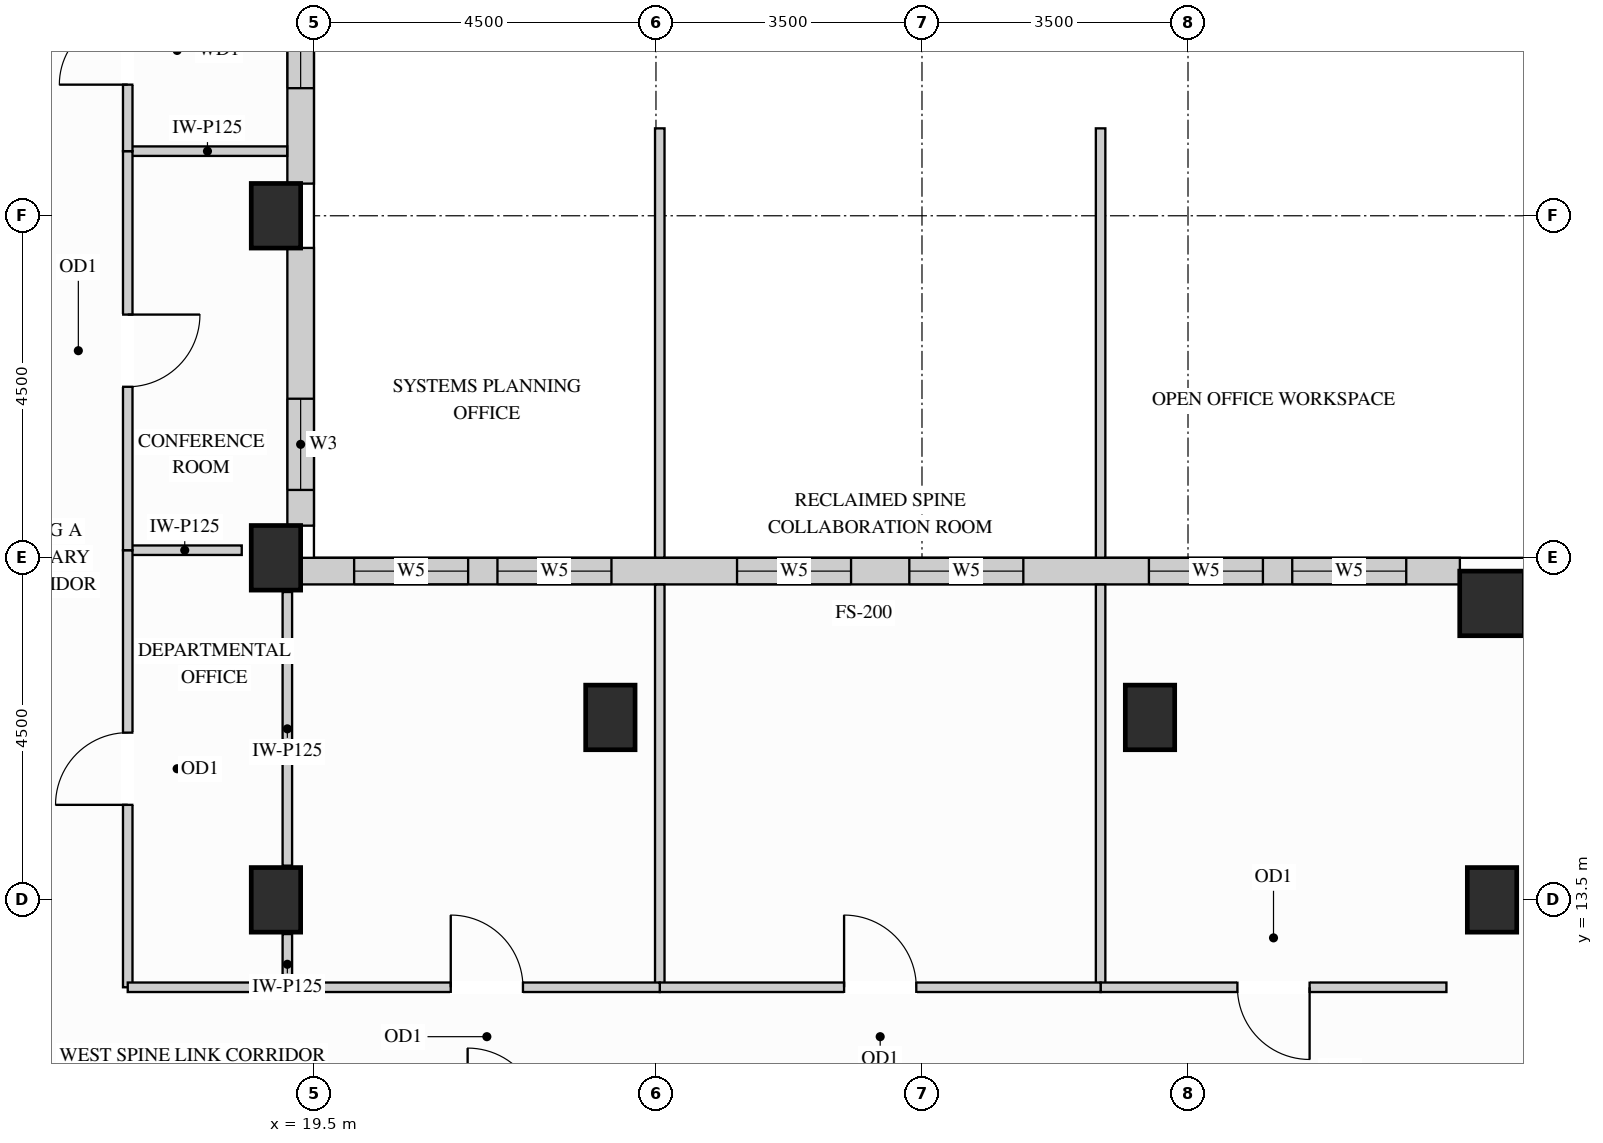
"""IFC4 building model, lengths in metres.
Left out: names, types, materials, properties, quantities, classifications, styles, units other than length and angle.
Written with IfcOpenShell. Run it as: python <this file> out.ifc"""

import sys

from ifc_helpers import new_model, si_unit, direction, frame, frame_2d, origin, origin_2d, place, context, subcontext, project, spatial, rectangle, extrude, source, transform, mapped, element, fill, save


model = new_model("IFC4")
c1 = context("Model", 3, precision=1e-05, world=origin(), true_north=direction((0.0, 1.0)))
c2 = subcontext(c1, "Body", "Model", "MODEL_VIEW")
j1 = project(units=[si_unit("LENGTHUNIT", "METRE"), si_unit("PLANEANGLEUNIT", "RADIAN")], contexts=[c1])
p1 = place(None, origin())
s1 = spatial("IfcSite", under=j1, at=p1, CompositionType="ELEMENT")
p2 = place(p1, origin())
s2 = spatial("IfcBuilding", under=s1, at=p2, CompositionType="ELEMENT")
p3 = place(p2, frame((0.0, 0.0, 216.0)))
s3 = spatial("IfcBuildingStorey", under=s2, at=p3, CompositionType="ELEMENT", Elevation=216.0)
m1 = source(origin(), c2, "Body", "SweptSolid", [
    extrude(rectangle(XDim=0.65, YDim=0.85, at=origin_2d()), origin(), (0.0, 0.0, 1.0), 3.4),
])
for number, where, z_axis, x_axis in (
    (1, (19.0, 13.5, 0.0), (0.0, 0.0, 1.0), (1.0, 0.0, 0.0)),
    (2, (19.0, 18.0, 0.0), (0.0, 0.0, 1.0), (1.0, 0.0, 0.0)),
    (3, (19.0, 22.5, 0.0), (0.0, 0.0, 1.0), (1.0, 0.0, 0.0)),
    (4, (35.0, 13.5, 0.0), (0.0, 0.0, 1.0), (1.0, 0.0, 0.0)),
    (5, (23.4, 15.9, 0.0), (0.0, 0.0, 1.0), (1.0, 0.0, 0.0)),
    (6, (30.5, 15.9, 0.0), (0.0, 0.0, 1.0), (1.0, 0.0, 0.0)),
):
    element("IfcColumn", number, at=place(p3, frame(where, z_axis=z_axis, x_axis=x_axis)), inside=s3, PredefinedType="COLUMN", context=c2, shape_type="MappedRepresentation", body=[
        mapped(m1, transform((0.0, 0.0, 0.0), x_axis=(1.0, 0.0, 0.0), y_axis=(0.0, 1.0, 0.0), z_axis=(0.0, 0.0, 1.0))),
    ])
m2 = source(origin(), c2, "Body", "SweptSolid", [
    extrude(rectangle(XDim=0.85, YDim=0.85, at=origin_2d()), origin(), (0.0, 0.0, 1.0), 3.4),
])
p4 = place(p3, frame((35.0, 17.4, 0.0), z_axis=(0.0, 0.0, 1.0), x_axis=(1.0, 0.0, 0.0)))
e7 = element("IfcColumn", 7, at=p4, inside=s3, PredefinedType="COLUMN", context=c2, shape_type="MappedRepresentation", body=[
    mapped(m2, transform((0.0, 0.0, 0.0), x_axis=(1.0, 0.0, 0.0), y_axis=(0.0, 1.0, 0.0), z_axis=(0.0, 0.0, 1.0))),
])
p5 = place(p3, frame((34.577, 17.825, 0.0), z_axis=(0.0, 0.0, 1.0), x_axis=(-1.0, 0.0, 0.0)))
e8 = element("IfcWall", 8, at=p5, inside=s3, PredefinedType="SOLIDWALL", context=c2, shape_type="SweptSolid", body=[
    extrude(rectangle(XDim=15.254, YDim=0.35, at=frame_2d((7.627, 0.0))), origin(), (0.0, 0.0, 1.0), 3.385),
])
p6 = place(p5, frame((0.706, 0.0, 0.78)))
e9 = element("IfcOpeningElement", 9, at=p6, cuts=e8, PredefinedType="OPENING", context=c2, shape_type="SweptSolid", body=[
    extrude(rectangle(XDim=1.5, YDim=2.0, at=frame_2d((0.75, 1.0))), frame((0.0, 0.185, 0.0), z_axis=(0.0, -1.0, 0.0), x_axis=(1.0, 0.0, 0.0)), (0.0, 0.0, 1.0), 0.37),
])
p7 = place(p5, frame((2.591, 0.0, 0.78)))
e10 = element("IfcOpeningElement", 10, at=p7, cuts=e8, PredefinedType="OPENING", context=c2, shape_type="SweptSolid", body=[
    extrude(rectangle(XDim=1.5, YDim=2.0, at=frame_2d((0.75, 1.0))), frame((0.0, 0.185, 0.0), z_axis=(0.0, -1.0, 0.0), x_axis=(1.0, 0.0, 0.0)), (0.0, 0.0, 1.0), 0.37),
])
p8 = place(p5, frame((5.744, 0.0, 0.78)))
e11 = element("IfcOpeningElement", 11, at=p8, cuts=e8, PredefinedType="OPENING", context=c2, shape_type="SweptSolid", body=[
    extrude(rectangle(XDim=1.5, YDim=2.0, at=frame_2d((0.75, 1.0))), frame((0.0, 0.185, 0.0), z_axis=(0.0, -1.0, 0.0), x_axis=(1.0, 0.0, 0.0)), (0.0, 0.0, 1.0), 0.37),
])
p9 = place(p5, frame((8.01, 0.0, 0.78)))
e12 = element("IfcOpeningElement", 12, at=p9, cuts=e8, PredefinedType="OPENING", context=c2, shape_type="SweptSolid", body=[
    extrude(rectangle(XDim=1.5, YDim=2.0, at=frame_2d((0.75, 1.0))), frame((0.0, 0.185, 0.0), z_axis=(0.0, -1.0, 0.0), x_axis=(1.0, 0.0, 0.0)), (0.0, 0.0, 1.0), 0.37),
])
p10 = place(p5, frame((11.163, 0.0, 0.78)))
e13 = element("IfcOpeningElement", 13, at=p10, cuts=e8, PredefinedType="OPENING", context=c2, shape_type="SweptSolid", body=[
    extrude(rectangle(XDim=1.5, YDim=2.0, at=frame_2d((0.75, 1.0))), frame((0.0, 0.185, 0.0), z_axis=(0.0, -1.0, 0.0), x_axis=(1.0, 0.0, 0.0)), (0.0, 0.0, 1.0), 0.37),
])
p11 = place(p5, frame((13.048, 0.0, 0.78)))
e14 = element("IfcOpeningElement", 14, at=p11, cuts=e8, PredefinedType="OPENING", context=c2, shape_type="SweptSolid", body=[
    extrude(rectangle(XDim=1.5, YDim=2.0, at=frame_2d((0.75, 1.0))), frame((0.0, 0.185, 0.0), z_axis=(0.0, -1.0, 0.0), x_axis=(1.0, 0.0, 0.0)), (0.0, 0.0, 1.0), 0.37),
])
p12 = place(p3, frame((19.325, 18.423, 0.0), z_axis=(0.0, 0.0, 1.0), x_axis=(0.0, 1.0, 0.0)))
e15 = element("IfcWall", 15, at=p12, inside=s3, PredefinedType="SOLIDWALL", context=c2, shape_type="SweptSolid", body=[
    extrude(rectangle(XDim=3.654, YDim=0.35, at=frame_2d((1.827, 0.0))), origin(), (0.0, 0.0, 1.0), 2.619),
])
p13 = place(p12, frame((0.47, 0.0, 0.78)))
e16 = element("IfcOpeningElement", 16, at=p13, cuts=e15, PredefinedType="OPENING", context=c2, shape_type="SweptSolid", body=[
    extrude(rectangle(XDim=1.2, YDim=1.659, at=frame_2d((0.6, 0.83))), frame((0.0, 0.185, 0.0), z_axis=(0.0, -1.0, 0.0), x_axis=(1.0, 0.0, 0.0)), (0.0, 0.0, 1.0), 0.37),
])
p14 = place(p3, frame((19.325, 22.923, 0.0), z_axis=(0.0, 0.0, 1.0), x_axis=(0.0, 1.0, 0.0)))
e17 = element("IfcWall", 17, at=p14, inside=s3, PredefinedType="SOLIDWALL", context=c2, shape_type="SweptSolid", body=[
    extrude(rectangle(XDim=3.454, YDim=0.35, at=frame_2d((1.727, 0.0))), origin(), (0.0, 0.0, 1.0), 2.619),
])
p15 = place(p14, frame((1.256, 0.0, 0.78)))
e18 = element("IfcOpeningElement", 18, at=p15, cuts=e17, PredefinedType="OPENING", context=c2, shape_type="SweptSolid", body=[
    extrude(rectangle(XDim=1.5, YDim=1.659, at=frame_2d((0.75, 0.83))), frame((0.0, 0.185, 0.0), z_axis=(0.0, -1.0, 0.0), x_axis=(1.0, 0.0, 0.0)), (0.0, 0.0, 1.0), 0.37),
])
m3 = source(origin(), c2, "Body", "SweptSolid", [
    extrude(rectangle(XDim=1.5, YDim=0.125, at=frame_2d((0.75, 0.0))), origin(), (0.0, 0.0, 1.0), 2.773),
])
p16 = place(p3, frame((17.05, 18.1, 0.0), z_axis=(0.0, 0.0, 1.0), x_axis=(1.0, 0.0, 0.0)))
e19 = element("IfcWall", 19, at=p16, inside=s3, PredefinedType="PARTITIONING", context=c2, shape_type="MappedRepresentation", body=[
    mapped(m3, transform((0.0, 0.0, 0.0), x_axis=(1.0, 0.0, 0.0), y_axis=(0.0, 1.0, 0.0), z_axis=(0.0, 0.0, 1.0))),
])
m4 = source(origin(), c2, "Body", "SweptSolid", [
    extrude(rectangle(XDim=2.098, YDim=0.125, at=frame_2d((1.049, 0.0))), origin(), (0.0, 0.0, 1.0), 3.385),
])
p17 = place(p3, frame((17.05, 23.35, 0.0), z_axis=(0.0, 0.0, 1.0), x_axis=(1.0, 0.0, 0.0)))
e20 = element("IfcWall", 20, at=p17, inside=s3, PredefinedType="PARTITIONING", context=c2, shape_type="MappedRepresentation", body=[
    mapped(m4, transform((0.0, 0.0, 0.0), x_axis=(1.0, 0.0, 0.0), y_axis=(0.0, 1.0, 0.0), z_axis=(0.0, 0.0, 1.0))),
])
m5 = source(origin(), c2, "Body", "SweptSolid", [
    extrude(rectangle(XDim=0.7, YDim=0.125, at=frame_2d((0.35, 0.0))), origin(), (0.0, 0.0, 1.0), 2.773),
])
p18 = place(p3, frame((19.15, 12.35, 0.0), z_axis=(0.0, 0.0, 1.0), x_axis=(0.0, 1.0, 0.0)))
e21 = element("IfcWall", 21, at=p18, inside=s3, PredefinedType="PARTITIONING", context=c2, shape_type="MappedRepresentation", body=[
    mapped(m5, transform((0.0, 0.0, 0.0), x_axis=(1.0, 0.0, 0.0), y_axis=(0.0, 1.0, 0.0), z_axis=(0.0, 0.0, 1.0))),
])
m6 = source(origin(), c2, "Body", "SweptSolid", [
    extrude(rectangle(XDim=3.6, YDim=0.125, at=frame_2d((1.8, 0.0))), origin(), (0.0, 0.0, 1.0), 2.773),
])
p19 = place(p3, frame((19.15, 13.95, 0.0), z_axis=(0.0, 0.0, 1.0), x_axis=(0.0, 1.0, 0.0)))
e22 = element("IfcWall", 22, at=p19, inside=s3, PredefinedType="PARTITIONING", context=c2, shape_type="MappedRepresentation", body=[
    mapped(m6, transform((0.0, 0.0, 0.0), x_axis=(1.0, 0.0, 0.0), y_axis=(0.0, 1.0, 0.0), z_axis=(0.0, 0.0, 1.0))),
])
p20 = place(p3, frame((17.05, 12.35, 0.0), z_axis=(0.0, 0.0, 1.0), x_axis=(0.0, 1.0, 0.0)))
e23 = element("IfcWall", 23, at=p20, inside=s3, PredefinedType="PARTITIONING", context=c2, shape_type="SweptSolid", body=[
    extrude(rectangle(XDim=5.75, YDim=0.125, at=frame_2d((2.875, 0.0))), origin(), (0.0, 0.0, 1.0), 3.385),
])
p21 = place(p20, frame((2.4, 0.0, 0.0)))
e24 = element("IfcOpeningElement", 24, at=p21, cuts=e23, PredefinedType="OPENING", context=c2, shape_type="SweptSolid", body=[
    extrude(rectangle(XDim=0.95, YDim=2.15, at=frame_2d((0.475, 1.075))), frame((0.0, 0.073, 0.0), z_axis=(0.0, -1.0, 0.0), x_axis=(1.0, 0.0, 0.0)), (0.0, 0.0, 1.0), 0.145),
])
p22 = place(p3, frame((17.05, 18.1, 0.0), z_axis=(0.0, 0.0, 1.0), x_axis=(0.0, 1.0, 0.0)))
e25 = element("IfcWall", 25, at=p22, inside=s3, PredefinedType="PARTITIONING", context=c2, shape_type="SweptSolid", body=[
    extrude(rectangle(XDim=5.25, YDim=0.125, at=frame_2d((2.625, 0.0))), origin(), (0.0, 0.0, 1.0), 3.385),
])
p23 = place(p22, frame((2.15, 0.0, 0.0)))
e26 = element("IfcOpeningElement", 26, at=p23, cuts=e25, PredefinedType="OPENING", context=c2, shape_type="SweptSolid", body=[
    extrude(rectangle(XDim=0.95, YDim=2.15, at=frame_2d((0.475, 1.075))), frame((0.0, 0.073, 0.0), z_axis=(0.0, -1.0, 0.0), x_axis=(1.0, 0.0, 0.0)), (0.0, 0.0, 1.0), 0.145),
])
p24 = place(p3, frame((17.05, 23.35, 0.0), z_axis=(0.0, 0.0, 1.0), x_axis=(0.0, 1.0, 0.0)))
e27 = element("IfcWall", 27, at=p24, inside=s3, PredefinedType="PARTITIONING", context=c2, shape_type="SweptSolid", body=[
    extrude(rectangle(XDim=2.7, YDim=0.125, at=frame_2d((1.35, 0.0))), origin(), (0.0, 0.0, 1.0), 3.385),
])
p25 = place(p24, frame((0.875, 0.0, 0.0)))
e28 = element("IfcOpeningElement", 28, at=p25, cuts=e27, PredefinedType="OPENING", context=c2, shape_type="SweptSolid", body=[
    extrude(rectangle(XDim=0.9, YDim=2.15, at=frame_2d((0.45, 1.075))), frame((0.0, 0.073, 0.0), z_axis=(0.0, -1.0, 0.0), x_axis=(1.0, 0.0, 0.0)), (0.0, 0.0, 1.0), 0.145),
])
m7 = source(origin(), c2, "Body", "SweptSolid", [
    extrude(rectangle(XDim=5.298, YDim=0.125, at=frame_2d((2.649, 0.0))), origin(), (0.0, 0.0, 1.0), 3.385),
])
p26 = place(p3, frame((24.05, 12.35, 0.0), z_axis=(0.0, 0.0, 1.0), x_axis=(0.0, 1.0, 0.0)))
e29 = element("IfcWall", 29, at=p26, inside=s3, PredefinedType="PARTITIONING", context=c2, shape_type="MappedRepresentation", body=[
    mapped(m7, transform((0.0, 0.0, 0.0), x_axis=(1.0, 0.0, 0.0), y_axis=(0.0, 1.0, 0.0), z_axis=(0.0, 0.0, 1.0))),
])
m8 = source(origin(), c2, "Body", "SweptSolid", [
    extrude(rectangle(XDim=5.648, YDim=0.125, at=frame_2d((2.824, 0.0))), origin(), (0.0, 0.0, 1.0), 3.385),
])
p27 = place(p3, frame((24.05, 18.002, 0.0), z_axis=(0.0, 0.0, 1.0), x_axis=(0.0, 1.0, 0.0)))
e30 = element("IfcWall", 30, at=p27, inside=s3, PredefinedType="PARTITIONING", context=c2, shape_type="MappedRepresentation", body=[
    mapped(m8, transform((0.0, 0.0, 0.0), x_axis=(1.0, 0.0, 0.0), y_axis=(0.0, 1.0, 0.0), z_axis=(0.0, 0.0, 1.0))),
])
p28 = place(p3, frame((29.85, 12.35, 0.0), z_axis=(0.0, 0.0, 1.0), x_axis=(0.0, 1.0, 0.0)))
e31 = element("IfcWall", 31, at=p28, inside=s3, PredefinedType="PARTITIONING", context=c2, shape_type="MappedRepresentation", body=[
    mapped(m7, transform((0.0, 0.0, 0.0), x_axis=(1.0, 0.0, 0.0), y_axis=(0.0, 1.0, 0.0), z_axis=(0.0, 0.0, 1.0))),
])
p29 = place(p3, frame((29.85, 18.002, 0.0), z_axis=(0.0, 0.0, 1.0), x_axis=(0.0, 1.0, 0.0)))
e32 = element("IfcWall", 32, at=p29, inside=s3, PredefinedType="PARTITIONING", context=c2, shape_type="MappedRepresentation", body=[
    mapped(m8, transform((0.0, 0.0, 0.0), x_axis=(1.0, 0.0, 0.0), y_axis=(0.0, 1.0, 0.0), z_axis=(0.0, 0.0, 1.0))),
])
p30 = place(p3, frame((29.85, 12.35, 0.0), z_axis=(0.0, 0.0, 1.0), x_axis=(1.0, 0.0, 0.0)))
e33 = element("IfcWall", 33, at=p30, inside=s3, PredefinedType="PARTITIONING", context=c2, shape_type="SweptSolid", body=[
    extrude(rectangle(XDim=4.55, YDim=0.125, at=frame_2d((2.275, 0.0))), origin(), (0.0, 0.0, 1.0), 3.385),
])
p31 = place(p30, frame((1.8, 0.0, 0.0)))
e34 = element("IfcOpeningElement", 34, at=p31, cuts=e33, PredefinedType="OPENING", context=c2, shape_type="SweptSolid", body=[
    extrude(rectangle(XDim=0.95, YDim=2.15, at=frame_2d((0.475, 1.075))), frame((0.0, 0.073, 0.0), z_axis=(0.0, -1.0, 0.0), x_axis=(1.0, 0.0, 0.0)), (0.0, 0.0, 1.0), 0.145),
])
p32 = place(p3, frame((24.05, 12.35, 0.0), z_axis=(0.0, 0.0, 1.0), x_axis=(1.0, 0.0, 0.0)))
e35 = element("IfcWall", 35, at=p32, inside=s3, PredefinedType="PARTITIONING", context=c2, shape_type="SweptSolid", body=[
    extrude(rectangle(XDim=5.8, YDim=0.125, at=frame_2d((2.9, 0.0))), origin(), (0.0, 0.0, 1.0), 3.385),
])
p33 = place(p32, frame((2.425, 0.0, 0.0)))
e36 = element("IfcOpeningElement", 36, at=p33, cuts=e35, PredefinedType="OPENING", context=c2, shape_type="SweptSolid", body=[
    extrude(rectangle(XDim=0.95, YDim=2.15, at=frame_2d((0.475, 1.075))), frame((0.0, 0.073, 0.0), z_axis=(0.0, -1.0, 0.0), x_axis=(1.0, 0.0, 0.0)), (0.0, 0.0, 1.0), 0.145),
])
m9 = source(origin(), c2, "Body", "SweptSolid", [
    extrude(rectangle(XDim=2.45, YDim=0.125, at=frame_2d((1.225, 0.0))), origin(), (0.0, 0.0, 1.0), 3.385),
])
p34 = place(p3, frame((17.05, 12.35, 0.0), z_axis=(0.0, 0.0, 1.0), x_axis=(1.0, 0.0, 0.0)))
e37 = element("IfcWall", 37, at=p34, inside=s3, PredefinedType="PARTITIONING", context=c2, shape_type="MappedRepresentation", body=[
    mapped(m9, transform((0.0, 0.0, 0.0), x_axis=(1.0, 0.0, 0.0), y_axis=(0.0, 1.0, 0.0), z_axis=(0.0, 0.0, 1.0))),
])
p35 = place(p3, frame((19.5, 12.35, 0.0), z_axis=(0.0, 0.0, 1.0), x_axis=(1.0, 0.0, 0.0)))
e38 = element("IfcWall", 38, at=p35, inside=s3, PredefinedType="PARTITIONING", context=c2, shape_type="SweptSolid", body=[
    extrude(rectangle(XDim=4.55, YDim=0.125, at=frame_2d((2.275, 0.0))), origin(), (0.0, 0.0, 1.0), 3.385),
])
p36 = place(p35, frame((1.8, 0.0, 0.0)))
e39 = element("IfcOpeningElement", 39, at=p36, cuts=e38, PredefinedType="OPENING", context=c2, shape_type="SweptSolid", body=[
    extrude(rectangle(XDim=0.95, YDim=2.15, at=frame_2d((0.475, 1.075))), frame((0.0, 0.073, 0.0), z_axis=(0.0, -1.0, 0.0), x_axis=(1.0, 0.0, 0.0)), (0.0, 0.0, 1.0), 0.145),
])
m10 = source(origin(), c2, "Body", "SweptSolid", [
    extrude(rectangle(XDim=0.95, YDim=2.15, at=frame_2d((0.475, 1.075))), frame((0.0, 0.025, 0.0), z_axis=(0.0, -1.0, 0.0), x_axis=(1.0, 0.0, 0.0)), (0.0, 0.0, 1.0), 0.05),
])
p37 = place(p21, origin())
e40 = element("IfcDoor", 40, at=p37, inside=s3, OperationType="SINGLE_SWING_LEFT", PredefinedType="DOOR", context=c2, shape_type="MappedRepresentation", body=[
    mapped(m10, transform((0.0, 0.0, 0.0), x_axis=(1.0, 0.0, 0.0), y_axis=(0.0, 1.0, 0.0), z_axis=(0.0, 0.0, 1.0))),
])
fill(e24, e40)
p38 = place(p23, origin())
e41 = element("IfcDoor", 41, at=p38, inside=s3, OperationType="SINGLE_SWING_RIGHT", PredefinedType="DOOR", context=c2, shape_type="MappedRepresentation", body=[
    mapped(m10, transform((0.0, 0.0, 0.0), x_axis=(1.0, 0.0, 0.0), y_axis=(0.0, 1.0, 0.0), z_axis=(0.0, 0.0, 1.0))),
])
fill(e26, e41)
p39 = place(p33, origin())
e42 = element("IfcDoor", 42, at=p39, inside=s3, OperationType="SINGLE_SWING_LEFT", PredefinedType="DOOR", context=c2, shape_type="MappedRepresentation", body=[
    mapped(m10, transform((0.0, 0.0, 0.0), x_axis=(1.0, 0.0, 0.0), y_axis=(0.0, 1.0, 0.0), z_axis=(0.0, 0.0, 1.0))),
])
fill(e36, e42)
p40 = place(p36, origin())
e43 = element("IfcDoor", 43, at=p40, inside=s3, OperationType="SINGLE_SWING_LEFT", PredefinedType="DOOR", context=c2, shape_type="MappedRepresentation", body=[
    mapped(m10, transform((0.0, 0.0, 0.0), x_axis=(1.0, 0.0, 0.0), y_axis=(0.0, 1.0, 0.0), z_axis=(0.0, 0.0, 1.0))),
])
fill(e39, e43)
p41 = place(p31, origin())
e44 = element("IfcDoor", 44, at=p41, inside=s3, OperationType="SINGLE_SWING_RIGHT", PredefinedType="DOOR", context=c2, shape_type="MappedRepresentation", body=[
    mapped(m10, transform((0.0, 0.0, 0.0), x_axis=(1.0, 0.0, 0.0), y_axis=(0.0, 1.0, 0.0), z_axis=(0.0, 0.0, 1.0))),
])
fill(e34, e44)
m11 = source(origin(), c2, "Body", "SweptSolid", [
    extrude(rectangle(XDim=0.9, YDim=2.15, at=frame_2d((0.45, 1.075))), frame((0.0, 0.025, 0.0), z_axis=(0.0, -1.0, 0.0), x_axis=(1.0, 0.0, 0.0)), (0.0, 0.0, 1.0), 0.05),
])
p42 = place(p25, origin())
e45 = element("IfcDoor", 45, at=p42, inside=s3, OperationType="SINGLE_SWING_LEFT", PredefinedType="DOOR", context=c2, shape_type="MappedRepresentation", body=[
    mapped(m11, transform((0.0, 0.0, 0.0), x_axis=(1.0, 0.0, 0.0), y_axis=(0.0, 1.0, 0.0), z_axis=(0.0, 0.0, 1.0))),
])
fill(e28, e45)
m12 = source(origin(), c2, "Body", "SweptSolid", [
    extrude(rectangle(XDim=1.2, YDim=1.659, at=frame_2d((0.6, 0.83))), frame((0.0, 0.03, 0.0), z_axis=(0.0, -1.0, 0.0), x_axis=(1.0, 0.0, 0.0)), (0.0, 0.0, 1.0), 0.06),
])
p43 = place(p13, origin())
e46 = element("IfcWindow", 46, at=p43, inside=s3, PartitioningType="SINGLE_PANEL", PredefinedType="WINDOW", context=c2, shape_type="MappedRepresentation", body=[
    mapped(m12, transform((0.0, 0.0, 0.0), x_axis=(1.0, 0.0, 0.0), y_axis=(0.0, 1.0, 0.0), z_axis=(0.0, 0.0, 1.0))),
])
fill(e16, e46)
m13 = source(origin(), c2, "Body", "SweptSolid", [
    extrude(rectangle(XDim=1.5, YDim=2.0, at=frame_2d((0.75, 1.0))), frame((0.0, 0.03, 0.0), z_axis=(0.0, -1.0, 0.0), x_axis=(1.0, 0.0, 0.0)), (0.0, 0.0, 1.0), 0.06),
])
p44 = place(p6, origin())
e47 = element("IfcWindow", 47, at=p44, inside=s3, PartitioningType="SINGLE_PANEL", PredefinedType="WINDOW", context=c2, shape_type="MappedRepresentation", body=[
    mapped(m13, transform((0.0, 0.0, 0.0), x_axis=(1.0, 0.0, 0.0), y_axis=(0.0, 1.0, 0.0), z_axis=(0.0, 0.0, 1.0))),
])
fill(e9, e47)
p45 = place(p7, origin())
e48 = element("IfcWindow", 48, at=p45, inside=s3, PartitioningType="SINGLE_PANEL", PredefinedType="WINDOW", context=c2, shape_type="MappedRepresentation", body=[
    mapped(m13, transform((0.0, 0.0, 0.0), x_axis=(1.0, 0.0, 0.0), y_axis=(0.0, 1.0, 0.0), z_axis=(0.0, 0.0, 1.0))),
])
fill(e10, e48)
p46 = place(p8, origin())
e49 = element("IfcWindow", 49, at=p46, inside=s3, PartitioningType="SINGLE_PANEL", PredefinedType="WINDOW", context=c2, shape_type="MappedRepresentation", body=[
    mapped(m13, transform((0.0, 0.0, 0.0), x_axis=(1.0, 0.0, 0.0), y_axis=(0.0, 1.0, 0.0), z_axis=(0.0, 0.0, 1.0))),
])
fill(e11, e49)
p47 = place(p9, origin())
e50 = element("IfcWindow", 50, at=p47, inside=s3, PartitioningType="SINGLE_PANEL", PredefinedType="WINDOW", context=c2, shape_type="MappedRepresentation", body=[
    mapped(m13, transform((0.0, 0.0, 0.0), x_axis=(1.0, 0.0, 0.0), y_axis=(0.0, 1.0, 0.0), z_axis=(0.0, 0.0, 1.0))),
])
fill(e12, e50)
p48 = place(p10, origin())
e51 = element("IfcWindow", 51, at=p48, inside=s3, PartitioningType="SINGLE_PANEL", PredefinedType="WINDOW", context=c2, shape_type="MappedRepresentation", body=[
    mapped(m13, transform((0.0, 0.0, 0.0), x_axis=(1.0, 0.0, 0.0), y_axis=(0.0, 1.0, 0.0), z_axis=(0.0, 0.0, 1.0))),
])
fill(e13, e51)
p49 = place(p11, origin())
e52 = element("IfcWindow", 52, at=p49, inside=s3, PartitioningType="SINGLE_PANEL", PredefinedType="WINDOW", context=c2, shape_type="MappedRepresentation", body=[
    mapped(m13, transform((0.0, 0.0, 0.0), x_axis=(1.0, 0.0, 0.0), y_axis=(0.0, 1.0, 0.0), z_axis=(0.0, 0.0, 1.0))),
])
fill(e14, e52)
m14 = source(origin(), c2, "Body", "SweptSolid", [
    extrude(rectangle(XDim=1.5, YDim=1.659, at=frame_2d((0.75, 0.83))), frame((0.0, 0.03, 0.0), z_axis=(0.0, -1.0, 0.0), x_axis=(1.0, 0.0, 0.0)), (0.0, 0.0, 1.0), 0.06),
])
p50 = place(p15, origin())
e53 = element("IfcWindow", 53, at=p50, inside=s3, PartitioningType="SINGLE_PANEL", PredefinedType="WINDOW", context=c2, shape_type="MappedRepresentation", body=[
    mapped(m14, transform((0.0, 0.0, 0.0), x_axis=(1.0, 0.0, 0.0), y_axis=(0.0, 1.0, 0.0), z_axis=(0.0, 0.0, 1.0))),
])
fill(e18, e53)
save(model, sys.argv[1])
